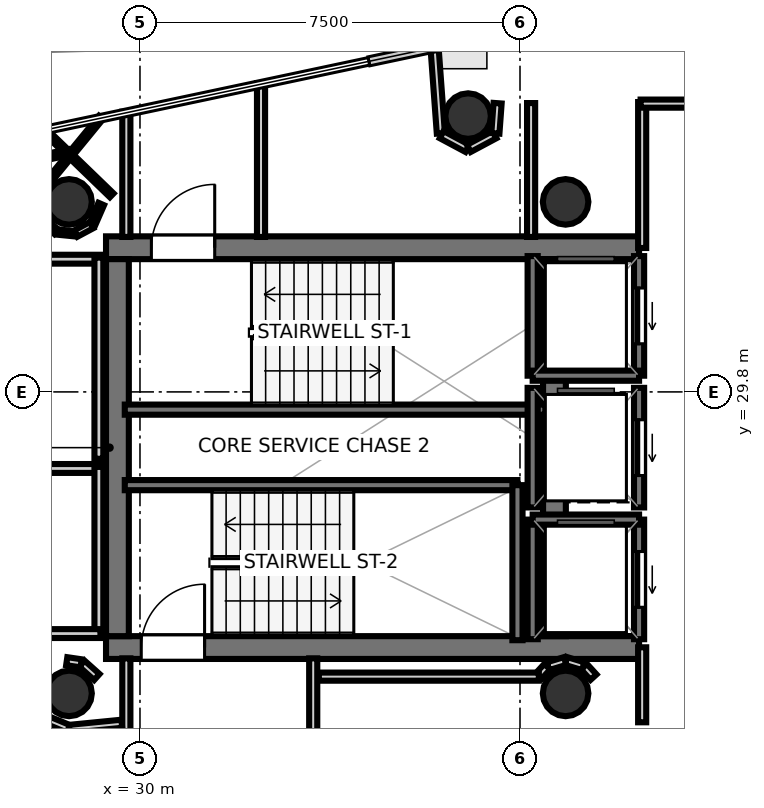
"""IFC4 building model, lengths in metres.
Left out: names, types, materials, properties, quantities, classifications, styles, units other than length and angle.
Written with IfcOpenShell. Run it as: python <this file> out.ifc"""

import sys

from ifc_helpers import new_model, si_unit, direction, frame, frame_2d, origin, origin_2d, place, context, subcontext, project, spatial, rectangle, hollow_circle, extrude, element, fill, save


model = new_model("IFC4")
c1 = context("Model", 3, precision=1e-05, world=origin(), true_north=direction((0.0, 1.0)))
c2 = subcontext(c1, "Body", "Model", "MODEL_VIEW")
j1 = project(units=[si_unit("LENGTHUNIT", "METRE"), si_unit("PLANEANGLEUNIT", "RADIAN")], contexts=[c1])
p1 = place(None, origin())
s1 = spatial("IfcSite", under=j1, at=p1, CompositionType="ELEMENT")
p2 = place(p1, origin())
s2 = spatial("IfcBuilding", under=s1, at=p2, CompositionType="ELEMENT")
p3 = place(p2, frame((0.0, 0.0, 302.8)))
s3 = spatial("IfcBuildingStorey", under=s2, at=p3, CompositionType="ELEMENT", Elevation=302.8)
p4 = place(p3, frame((29.33, 32.645, 0.0), z_axis=(0.0, 0.0, 1.0), x_axis=(1.0, 0.0, 0.0)))
e1 = element("IfcWall", 1, at=p4, inside=s3, PredefinedType="SHEAR", context=c2, shape_type="SweptSolid", body=[
    extrude(rectangle(XDim=10.52, YDim=0.45, at=frame_2d((5.26, 0.0))), origin(), (0.0, 0.0, 1.0), 3.52),
])
p5 = place(p4, frame((0.895, 0.0, 0.0)))
e2 = element("IfcOpeningElement", 2, at=p5, cuts=e1, PredefinedType="OPENING", context=c2, shape_type="SweptSolid", body=[
    extrude(rectangle(XDim=1.25, YDim=2.15, at=frame_2d((0.625, 1.075))), frame((0.0, 0.235, 0.0), z_axis=(0.0, -1.0, 0.0), x_axis=(1.0, 0.0, 0.0)), (0.0, 0.0, 1.0), 0.47),
])
p6 = place(p3, frame((29.33, 24.755, 0.0), z_axis=(0.0, 0.0, 1.0), x_axis=(1.0, 0.0, 0.0)))
e3 = element("IfcWall", 3, at=p6, inside=s3, PredefinedType="SHEAR", context=c2, shape_type="SweptSolid", body=[
    extrude(rectangle(XDim=10.52, YDim=0.45, at=frame_2d((5.26, 0.0))), origin(), (0.0, 0.0, 1.0), 3.52),
])
p7 = place(p6, frame((0.695, 0.0, 0.0)))
e4 = element("IfcOpeningElement", 4, at=p7, cuts=e3, PredefinedType="OPENING", context=c2, shape_type="SweptSolid", body=[
    extrude(rectangle(XDim=1.25, YDim=2.15, at=frame_2d((0.625, 1.075))), frame((0.0, 0.235, 0.0), z_axis=(0.0, -1.0, 0.0), x_axis=(1.0, 0.0, 0.0)), (0.0, 0.0, 1.0), 0.47),
])
for number, where, z_axis, x_axis in (
    (5, (29.555, 24.98, 0.0), (0.0, 0.0, 1.0), (0.0, 1.0, 0.0)),
    (6, (38.18, 24.98, 0.0), (0.0, 0.0, 1.0), (0.0, 1.0, 0.0)),
):
    element("IfcWall", number, at=place(p3, frame(where, z_axis=z_axis, x_axis=x_axis)), inside=s3, PredefinedType="SHEAR", context=c2, shape_type="SweptSolid", body=[
        extrude(rectangle(XDim=7.44, YDim=0.45, at=frame_2d((3.72, 0.0))), origin(), (0.0, 0.0, 1.0), 3.52),
    ])
for number, where, z_axis, x_axis in (
    (7, (28.6, 33.55, 0.0), (0.0, 0.0, 1.0), (1.0, 0.0, 0.0)),
    (8, (28.6, 23.85, 0.0), (0.0, 0.0, 1.0), (1.0, 0.0, 0.0)),
    (9, (38.4, 33.55, 0.0), (0.0, 0.0, 1.0), (1.0, 0.0, 0.0)),
    (10, (38.4, 23.85, 0.0), (0.0, 0.0, 1.0), (1.0, 0.0, 0.0)),
    (11, (36.476, 35.243, 0.0), (0.0, 0.0, 1.0), (1.0, 0.0, 0.0)),
):
    element("IfcColumn", number, at=place(p3, frame(where, z_axis=z_axis, x_axis=x_axis)), inside=s3, PredefinedType="COLUMN", context=c2, shape_type="SweptSolid", body=[
        extrude(hollow_circle(Radius=0.45, WallThickness=0.025, at=origin_2d()), origin(), (0.0, 0.0, 1.0), 3.7),
    ])
p8 = place(p3, frame((29.7, 29.45, 0.0), z_axis=(0.0, 0.0, 1.0), x_axis=(1.0, 0.0, 0.0)))
e12 = element("IfcWall", 12, at=p8, inside=s3, PredefinedType="SOLIDWALL", context=c2, shape_type="SweptSolid", body=[
    extrude(rectangle(XDim=8.3, YDim=0.2, at=frame_2d((4.15, 0.0))), origin(), (0.0, 0.0, 1.0), 3.52),
])
p9 = place(p3, frame((29.7, 27.96, 0.0), z_axis=(0.0, 0.0, 1.0), x_axis=(1.0, 0.0, 0.0)))
e13 = element("IfcWall", 13, at=p9, inside=s3, PredefinedType="SOLIDWALL", context=c2, shape_type="SweptSolid", body=[
    extrude(rectangle(XDim=7.75, YDim=0.2, at=frame_2d((3.875, 0.0))), origin(), (0.0, 0.0, 1.0), 3.52),
])
p10 = place(p3, frame((37.45, 24.9, 0.0), z_axis=(0.0, 0.0, 1.0), x_axis=(0.0, 1.0, 0.0)))
e14 = element("IfcWall", 14, at=p10, inside=s3, PredefinedType="SOLIDWALL", context=c2, shape_type="SweptSolid", body=[
    extrude(rectangle(XDim=3.06, YDim=0.2, at=frame_2d((1.53, 0.0))), origin(), (0.0, 0.0, 1.0), 3.52),
])
p11 = place(p3, frame((39.85, 30.12, 0.0), z_axis=(0.0, 0.0, 1.0), x_axis=(0.0, 1.0, 0.0)))
e15 = element("IfcWall", 15, at=p11, inside=s3, PredefinedType="SOLIDWALL", context=c2, shape_type="SweptSolid", body=[
    extrude(rectangle(XDim=2.36, YDim=0.2, at=frame_2d((1.18, 0.0))), origin(), (0.0, 0.0, 1.0), 3.52),
])
p12 = place(p11, frame((0.63, 0.0, 0.0)))
e16 = element("IfcOpeningElement", 16, at=p12, cuts=e15, PredefinedType="OPENING", context=c2, shape_type="SweptSolid", body=[
    extrude(rectangle(XDim=1.1, YDim=2.15, at=frame_2d((0.55, 1.075))), frame((0.0, 0.11, 0.0), z_axis=(0.0, -1.0, 0.0), x_axis=(1.0, 0.0, 0.0)), (0.0, 0.0, 1.0), 0.22),
])
p13 = place(p3, frame((37.75, 30.12, 0.0), z_axis=(0.0, 0.0, 1.0), x_axis=(0.0, 1.0, 0.0)))
e17 = element("IfcWall", 17, at=p13, inside=s3, PredefinedType="SOLIDWALL", context=c2, shape_type="SweptSolid", body=[
    extrude(rectangle(XDim=2.36, YDim=0.2, at=frame_2d((1.18, 0.0))), origin(), (0.0, 0.0, 1.0), 3.52),
])
p14 = place(p3, frame((37.75, 30.12, 0.0), z_axis=(0.0, 0.0, 1.0), x_axis=(1.0, 0.0, 0.0)))
e18 = element("IfcWall", 18, at=p14, inside=s3, PredefinedType="SOLIDWALL", context=c2, shape_type="SweptSolid", body=[
    extrude(rectangle(XDim=2.1, YDim=0.2, at=frame_2d((1.05, 0.0))), origin(), (0.0, 0.0, 1.0), 3.52),
])
p15 = place(p3, frame((39.85, 24.92, 0.0), z_axis=(0.0, 0.0, 1.0), x_axis=(0.0, 1.0, 0.0)))
e19 = element("IfcWall", 19, at=p15, inside=s3, PredefinedType="SOLIDWALL", context=c2, shape_type="SweptSolid", body=[
    extrude(rectangle(XDim=2.36, YDim=0.2, at=frame_2d((1.18, 0.0))), origin(), (0.0, 0.0, 1.0), 3.52),
])
p16 = place(p15, frame((0.63, 0.0, 0.0)))
e20 = element("IfcOpeningElement", 20, at=p16, cuts=e19, PredefinedType="OPENING", context=c2, shape_type="SweptSolid", body=[
    extrude(rectangle(XDim=1.1, YDim=2.15, at=frame_2d((0.55, 1.075))), frame((0.0, 0.11, 0.0), z_axis=(0.0, -1.0, 0.0), x_axis=(1.0, 0.0, 0.0)), (0.0, 0.0, 1.0), 0.22),
])
p17 = place(p3, frame((37.75, 24.92, 0.0), z_axis=(0.0, 0.0, 1.0), x_axis=(0.0, 1.0, 0.0)))
e21 = element("IfcWall", 21, at=p17, inside=s3, PredefinedType="SOLIDWALL", context=c2, shape_type="SweptSolid", body=[
    extrude(rectangle(XDim=2.36, YDim=0.2, at=frame_2d((1.18, 0.0))), origin(), (0.0, 0.0, 1.0), 3.52),
])
p18 = place(p3, frame((37.75, 27.28, 0.0), z_axis=(0.0, 0.0, 1.0), x_axis=(1.0, 0.0, 0.0)))
e22 = element("IfcWall", 22, at=p18, inside=s3, PredefinedType="SOLIDWALL", context=c2, shape_type="SweptSolid", body=[
    extrude(rectangle(XDim=2.1, YDim=0.2, at=frame_2d((1.05, 0.0))), origin(), (0.0, 0.0, 1.0), 3.52),
])
p19 = place(p3, frame((39.85, 27.52, 0.0), z_axis=(0.0, 0.0, 1.0), x_axis=(0.0, 1.0, 0.0)))
e23 = element("IfcWall", 23, at=p19, inside=s3, PredefinedType="SOLIDWALL", context=c2, shape_type="SweptSolid", body=[
    extrude(rectangle(XDim=2.36, YDim=0.2, at=frame_2d((1.18, 0.0))), origin(), (0.0, 0.0, 1.0), 3.52),
])
p20 = place(p19, frame((0.63, 0.0, 0.0)))
e24 = element("IfcOpeningElement", 24, at=p20, cuts=e23, PredefinedType="OPENING", context=c2, shape_type="SweptSolid", body=[
    extrude(rectangle(XDim=1.1, YDim=2.15, at=frame_2d((0.55, 1.075))), frame((0.0, 0.11, 0.0), z_axis=(0.0, -1.0, 0.0), x_axis=(1.0, 0.0, 0.0)), (0.0, 0.0, 1.0), 0.22),
])
p21 = place(p3, frame((37.75, 27.52, 0.0), z_axis=(0.0, 0.0, 1.0), x_axis=(0.0, 1.0, 0.0)))
e25 = element("IfcWall", 25, at=p21, inside=s3, PredefinedType="SOLIDWALL", context=c2, shape_type="SweptSolid", body=[
    extrude(rectangle(XDim=2.36, YDim=0.2, at=frame_2d((1.18, 0.0))), origin(), (0.0, 0.0, 1.0), 3.52),
])
p22 = place(p3, frame((29.731, 32.858, 0.0), z_axis=(0.0, 0.0, 1.0), x_axis=(0.0, 1.0, 0.0)))
e26 = element("IfcWall", 26, at=p22, inside=s3, PredefinedType="PARTITIONING", context=c2, shape_type="SweptSolid", body=[
    extrude(rectangle(XDim=2.471, YDim=0.16, at=frame_2d((1.235, 0.0))), origin(), (0.0, 0.0, 1.0), 2.84),
])
p23 = place(p3, frame((32.389, 35.892, 0.0), z_axis=(0.0, 0.0, 1.0), x_axis=(0.0, -1.0, 0.0)))
e27 = element("IfcWall", 27, at=p23, inside=s3, PredefinedType="PARTITIONING", context=c2, shape_type="SweptSolid", body=[
    extrude(rectangle(XDim=3.034, YDim=0.16, at=frame_2d((1.517, 0.0))), origin(), (0.0, 0.0, 1.0), 2.84),
])
for number, where, z_axis, x_axis in (
    (28, (29.731, 21.85, 0.0), (0.0, 0.0, 1.0), (0.0, 1.0, 0.0)),
    (29, (33.419, 24.542, 0.0), (0.0, 0.0, 1.0), (0.0, -1.0, 0.0)),
):
    element("IfcWall", number, at=place(p3, frame(where, z_axis=z_axis, x_axis=x_axis)), inside=s3, PredefinedType="PARTITIONING", context=c2, shape_type="SweptSolid", body=[
        extrude(rectangle(XDim=2.692, YDim=0.16, at=frame_2d((1.346, 0.0))), origin(), (0.0, 0.0, 1.0), 2.84),
    ])
p24 = place(p3, frame((39.911, 23.28, 0.0), z_axis=(0.0, 0.0, 1.0), x_axis=(0.0, 1.0, 0.0)))
e30 = element("IfcWall", 30, at=p24, inside=s3, PredefinedType="PARTITIONING", context=c2, shape_type="SweptSolid", body=[
    extrude(rectangle(XDim=1.48, YDim=0.16, at=frame_2d((0.74, 0.0))), origin(), (0.0, 0.0, 1.0), 2.84),
])
p25 = place(p3, frame((39.911, 32.64, 0.0), z_axis=(0.0, 0.0, 1.0), x_axis=(0.0, 1.0, 0.0)))
e31 = element("IfcWall", 31, at=p25, inside=s3, PredefinedType="PARTITIONING", context=c2, shape_type="SweptSolid", body=[
    extrude(rectangle(XDim=2.88, YDim=0.16, at=frame_2d((1.44, 0.0))), origin(), (0.0, 0.0, 1.0), 2.84),
])
p26 = place(p3, frame((39.88, 35.489, 0.0), z_axis=(0.0, 0.0, 1.0), x_axis=(1.0, 0.0, 0.0)))
e32 = element("IfcWall", 32, at=p26, inside=s3, PredefinedType="PARTITIONING", context=c2, shape_type="SweptSolid", body=[
    extrude(rectangle(XDim=1.48, YDim=0.16, at=frame_2d((0.74, 0.0))), origin(), (0.0, 0.0, 1.0), 2.84),
])
p27 = place(p3, frame((27.72, 28.289, 0.0), z_axis=(0.0, 0.0, 1.0), x_axis=(1.0, 0.0, 0.0)))
e33 = element("IfcWall", 33, at=p27, inside=s3, PredefinedType="PLUMBINGWALL", context=c2, shape_type="SweptSolid", body=[
    extrude(rectangle(XDim=1.5, YDim=0.175, at=frame_2d((0.75, 0.0))), origin(), (0.0, 0.0, 1.0), 2.84),
])
p28 = place(p3, frame((29.189, 28.32, 0.0), z_axis=(0.0, 0.0, 1.0), x_axis=(0.0, -1.0, 0.0)))
e34 = element("IfcWall", 34, at=p28, inside=s3, PredefinedType="PLUMBINGWALL", context=c2, shape_type="SweptSolid", body=[
    extrude(rectangle(XDim=3.32, YDim=0.175, at=frame_2d((1.66, 0.0))), origin(), (0.0, 0.0, 1.0), 2.84),
])
for number, where, z_axis, x_axis in (
    (35, (29.22, 25.031, 0.0), (0.0, 0.0, 1.0), (-1.0, 0.0, 0.0)),
    (36, (27.72, 32.419, 0.0), (0.0, 0.0, 1.0), (1.0, 0.0, 0.0)),
):
    element("IfcWall", number, at=place(p3, frame(where, z_axis=z_axis, x_axis=x_axis)), inside=s3, PredefinedType="PLUMBINGWALL", context=c2, shape_type="SweptSolid", body=[
        extrude(rectangle(XDim=1.5, YDim=0.175, at=frame_2d((0.75, 0.0))), origin(), (0.0, 0.0, 1.0), 2.84),
    ])
p29 = place(p3, frame((29.189, 32.45, 0.0), z_axis=(0.0, 0.0, 1.0), x_axis=(0.0, -1.0, 0.0)))
e37 = element("IfcWall", 37, at=p29, inside=s3, PredefinedType="PLUMBINGWALL", context=c2, shape_type="SweptSolid", body=[
    extrude(rectangle(XDim=3.97, YDim=0.175, at=frame_2d((1.985, 0.0))), origin(), (0.0, 0.0, 1.0), 2.84),
])
p30 = place(p3, frame((38.951, 24.171, 0.0), z_axis=(0.0, 0.0, 1.0), x_axis=(-0.674186852077, 0.738560822469, 0.0)))
e38 = element("IfcWall", 38, at=p30, inside=s3, PredefinedType="PARTITIONING", context=c2, shape_type="SweptSolid", body=[
    extrude(rectangle(XDim=0.281, YDim=0.16, at=frame_2d((0.14, 0.0))), origin(), (0.0, 0.0, 1.0), 2.84),
])
p31 = place(p3, frame((38.748, 24.387, 0.0), z_axis=(0.0, 0.0, 1.0), x_axis=(-0.956948991291, 0.290256142171, 0.0)))
e39 = element("IfcWall", 39, at=p31, inside=s3, PredefinedType="PARTITIONING", context=c2, shape_type="SweptSolid", body=[
    extrude(rectangle(XDim=0.354, YDim=0.16, at=frame_2d((0.177, 0.0))), origin(), (0.0, 0.0, 1.0), 2.84),
])
p32 = place(p3, frame((38.391, 24.49, 0.0), z_axis=(0.0, 0.0, 1.0), x_axis=(-0.957007018611, -0.290064762301, 0.0)))
e40 = element("IfcWall", 40, at=p32, inside=s3, PredefinedType="PARTITIONING", context=c2, shape_type="SweptSolid", body=[
    extrude(rectangle(XDim=0.354, YDim=0.16, at=frame_2d((0.177, 0.0))), origin(), (0.0, 0.0, 1.0), 2.84),
])
p33 = place(p3, frame((38.038, 24.378, 0.0), z_axis=(0.0, 0.0, 1.0), x_axis=(-0.673658387955, -0.739042878551, 0.0)))
e41 = element("IfcWall", 41, at=p33, inside=s3, PredefinedType="PARTITIONING", context=c2, shape_type="SweptSolid", body=[
    extrude(rectangle(XDim=0.246, YDim=0.16, at=frame_2d((0.123, 0.0))), origin(), (0.0, 0.0, 1.0), 2.84),
])
p34 = place(p3, frame((37.872, 24.181, 0.0), z_axis=(0.0, 0.0, 1.0), x_axis=(-1.0, 0.0, 0.0)))
e42 = element("IfcWall", 42, at=p34, inside=s3, PredefinedType="PARTITIONING", context=c2, shape_type="SweptSolid", body=[
    extrude(rectangle(XDim=4.342, YDim=0.16, at=frame_2d((2.171, 0.0))), origin(), (0.0, 0.0, 1.0), 2.84),
])
p35 = place(p3, frame((29.149, 24.173, 0.0), z_axis=(0.0, 0.0, 1.0), x_axis=(-0.745225165416, 0.666812906917, 0.0)))
e43 = element("IfcWall", 43, at=p35, inside=s3, PredefinedType="PARTITIONING", context=c2, shape_type="SweptSolid", body=[
    extrude(rectangle(XDim=0.396, YDim=0.16, at=frame_2d((0.198, 0.0))), origin(), (0.0, 0.0, 1.0), 2.84),
])
p36 = place(p3, frame((28.838, 24.444, 0.0), z_axis=(0.0, 0.0, 1.0), x_axis=(-0.989449148305, 0.144880581578, 0.0)))
e44 = element("IfcWall", 44, at=p36, inside=s3, PredefinedType="PARTITIONING", context=c2, shape_type="SweptSolid", body=[
    extrude(rectangle(XDim=0.286, YDim=0.16, at=frame_2d((0.143, 0.0))), origin(), (0.0, 0.0, 1.0), 2.84),
])
p37 = place(p3, frame((35.812, 36.618, 0.0), z_axis=(0.0, 0.0, 1.0), x_axis=(0.073354271493, -0.997305946465, 0.0)))
e45 = element("IfcWall", 45, at=p37, inside=s3, PredefinedType="PARTITIONING", context=c2, shape_type="SweptSolid", body=[
    extrude(rectangle(XDim=1.721, YDim=0.16, at=frame_2d((0.86, 0.0))), origin(), (0.0, 0.0, 1.0), 2.84),
])
for number, where, z_axis, x_axis in (
    (46, (35.954, 34.877, 0.0), (0.0, 0.0, 1.0), (0.882, -0.471, 0.0)),
    (47, (36.49, 34.606, 0.0), (0.0, 0.0, 1.0), (0.882, 0.471, 0.0)),
):
    element("IfcWall", number, at=place(p3, frame(where, z_axis=z_axis, x_axis=x_axis)), inside=s3, PredefinedType="PARTITIONING", context=c2, shape_type="SweptSolid", body=[
        extrude(rectangle(XDim=0.575, YDim=0.16, at=frame_2d((0.288, 0.0))), origin(), (0.0, 0.0, 1.0), 2.84),
    ])
p38 = place(p3, frame((37.014, 34.902, 0.0), z_axis=(0.0, 0.0, 1.0), x_axis=(0.073134230676, 0.997322106595, 0.0)))
e48 = element("IfcWall", 48, at=p38, inside=s3, PredefinedType="PARTITIONING", context=c2, shape_type="SweptSolid", body=[
    extrude(rectangle(XDim=0.598, YDim=0.16, at=frame_2d((0.299, 0.0))), origin(), (0.0, 0.0, 1.0), 2.84),
])
p39 = place(p3, frame((37.719, 35.5, 0.0), z_axis=(0.0, 0.0, 1.0), x_axis=(0.0, -1.0, 0.0)))
e49 = element("IfcWall", 49, at=p39, inside=s3, PredefinedType="PARTITIONING", context=c2, shape_type="SweptSolid", body=[
    extrude(rectangle(XDim=2.642, YDim=0.16, at=frame_2d((1.321, 0.0))), origin(), (0.0, 0.0, 1.0), 2.84),
])
p40 = place(p3, frame((28.115, 23.348, 0.0), z_axis=(0.0, 0.0, 1.0), x_axis=(0.923807847969, -0.382856448334, 0.0)))
e50 = element("IfcWall", 50, at=p40, inside=s3, PredefinedType="PARTITIONING", context=c2, shape_type="SweptSolid", body=[
    extrude(rectangle(XDim=0.513, YDim=0.16, at=frame_2d((0.256, 0.0))), origin(), (0.0, 0.0, 1.0), 2.84),
])
p41 = place(p3, frame((28.603, 23.149, 0.0), z_axis=(0.0, 0.0, 1.0), x_axis=(0.995179827095, 0.098066873836, 0.0)))
e51 = element("IfcWall", 51, at=p41, inside=s3, PredefinedType="PARTITIONING", context=c2, shape_type="SweptSolid", body=[
    extrude(rectangle(XDim=1.043, YDim=0.16, at=frame_2d((0.521, 0.0))), origin(), (0.0, 0.0, 1.0), 2.84),
])
p42 = place(p3, frame((23.581, 33.468, 0.0), z_axis=(0.0, 0.0, 1.0), x_axis=(0.978268763822, 0.207340844336, 0.0)))
e52 = element("IfcWall", 52, at=p42, inside=s3, PredefinedType="PARTITIONING", context=c2, shape_type="SweptSolid", body=[
    extrude(rectangle(XDim=5.114, YDim=0.12, at=frame_2d((2.557, 0.0))), origin(), (0.0, 0.0, 1.0), 2.84),
])
p43 = place(p3, frame((28.096, 34.979, 0.0), z_axis=(0.0, 0.0, 1.0), x_axis=(0.719392468402, -0.694603826945, 0.0)))
e53 = element("IfcWall", 53, at=p43, inside=s3, PredefinedType="PARTITIONING", context=c2, shape_type="SweptSolid", body=[
    extrude(rectangle(XDim=1.871, YDim=0.105, at=frame_2d((0.936, 0.0))), origin(), (0.0, 0.0, 1.0), 2.84),
])
p44 = place(p3, frame((29.231, 35.216, 0.0), z_axis=(0.0, 0.0, 1.0), x_axis=(-0.634428353152, -0.772981671656, 0.0)))
e54 = element("IfcWall", 54, at=p44, inside=s3, PredefinedType="PARTITIONING", context=c2, shape_type="SweptSolid", body=[
    extrude(rectangle(XDim=1.975, YDim=0.105, at=frame_2d((0.988, 0.0))), origin(), (0.0, 0.0, 1.0), 2.84),
])
p45 = place(p3, frame((28.073, 33.187, 0.0), z_axis=(0.0, 0.0, 1.0), x_axis=(0.773281307259, -0.634063103992, 0.0)))
e55 = element("IfcWall", 55, at=p45, inside=s3, PredefinedType="PARTITIONING", context=c2, shape_type="SweptSolid", body=[
    extrude(rectangle(XDim=0.354, YDim=0.12, at=frame_2d((0.177, 0.0))), origin(), (0.0, 0.0, 1.0), 2.84),
])
p46 = place(p3, frame((28.364, 32.956, 0.0), z_axis=(0.0, 0.0, 1.0), x_axis=(0.995199611942, -0.097865889817, 0.0)))
e56 = element("IfcWall", 56, at=p46, inside=s3, PredefinedType="PARTITIONING", context=c2, shape_type="SweptSolid", body=[
    extrude(rectangle(XDim=0.354, YDim=0.105, at=frame_2d((0.177, 0.0))), origin(), (0.0, 0.0, 1.0), 2.84),
])
p47 = place(p3, frame((28.734, 32.924, 0.0), z_axis=(0.0, 0.0, 1.0), x_axis=(0.881817981942, 0.471589913721, 0.0)))
e57 = element("IfcWall", 57, at=p47, inside=s3, PredefinedType="PARTITIONING", context=c2, shape_type="SweptSolid", body=[
    extrude(rectangle(XDim=0.354, YDim=0.14, at=frame_2d((0.177, 0.0))), origin(), (0.0, 0.0, 1.0), 2.84),
])
p48 = place(p3, frame((29.06, 33.106, 0.0), z_axis=(0.0, 0.0, 1.0), x_axis=(0.400352069216, 0.916361402872, 0.0)))
e58 = element("IfcWall", 58, at=p48, inside=s3, PredefinedType="PARTITIONING", context=c2, shape_type="SweptSolid", body=[
    extrude(rectangle(XDim=0.439, YDim=0.12, at=frame_2d((0.219, 0.0))), origin(), (0.0, 0.0, 1.0), 2.84),
])
p49 = place(p5, origin())
e59 = element("IfcDoor", 59, at=p49, inside=s3, OperationType="SINGLE_SWING_RIGHT", PredefinedType="DOOR", context=c2, shape_type="SweptSolid", body=[
    extrude(rectangle(XDim=1.25, YDim=2.15, at=frame_2d((0.625, 1.075))), frame((0.0, 0.025, 0.0), z_axis=(0.0, -1.0, 0.0), x_axis=(1.0, 0.0, 0.0)), (0.0, 0.0, 1.0), 0.05),
])
fill(e2, e59)
p50 = place(p7, origin())
e60 = element("IfcDoor", 60, at=p50, inside=s3, OperationType="SINGLE_SWING_RIGHT", PredefinedType="DOOR", context=c2, shape_type="SweptSolid", body=[
    extrude(rectangle(XDim=1.25, YDim=2.15, at=frame_2d((0.625, 1.075))), frame((0.0, 0.025, 0.0), z_axis=(0.0, -1.0, 0.0), x_axis=(1.0, 0.0, 0.0)), (0.0, 0.0, 1.0), 0.05),
])
fill(e4, e60)
p51 = place(p12, origin())
e61 = element("IfcDoor", 61, at=p51, inside=s3, OperationType="SLIDING_TO_LEFT", PredefinedType="DOOR", context=c2, shape_type="SweptSolid", body=[
    extrude(rectangle(XDim=1.1, YDim=2.15, at=frame_2d((0.55, 1.075))), frame((0.0, 0.025, 0.0), z_axis=(0.0, -1.0, 0.0), x_axis=(1.0, 0.0, 0.0)), (0.0, 0.0, 1.0), 0.05),
])
fill(e16, e61)
p52 = place(p16, origin())
e62 = element("IfcDoor", 62, at=p52, inside=s3, OperationType="SLIDING_TO_LEFT", PredefinedType="DOOR", context=c2, shape_type="SweptSolid", body=[
    extrude(rectangle(XDim=1.1, YDim=2.15, at=frame_2d((0.55, 1.075))), frame((0.0, 0.025, 0.0), z_axis=(0.0, -1.0, 0.0), x_axis=(1.0, 0.0, 0.0)), (0.0, 0.0, 1.0), 0.05),
])
fill(e20, e62)
p53 = place(p20, origin())
e63 = element("IfcDoor", 63, at=p53, inside=s3, OperationType="SLIDING_TO_LEFT", PredefinedType="DOOR", context=c2, shape_type="SweptSolid", body=[
    extrude(rectangle(XDim=1.1, YDim=2.15, at=frame_2d((0.55, 1.075))), frame((0.0, 0.025, 0.0), z_axis=(0.0, -1.0, 0.0), x_axis=(1.0, 0.0, 0.0)), (0.0, 0.0, 1.0), 0.05),
])
fill(e24, e63)
save(model, sys.argv[1])
